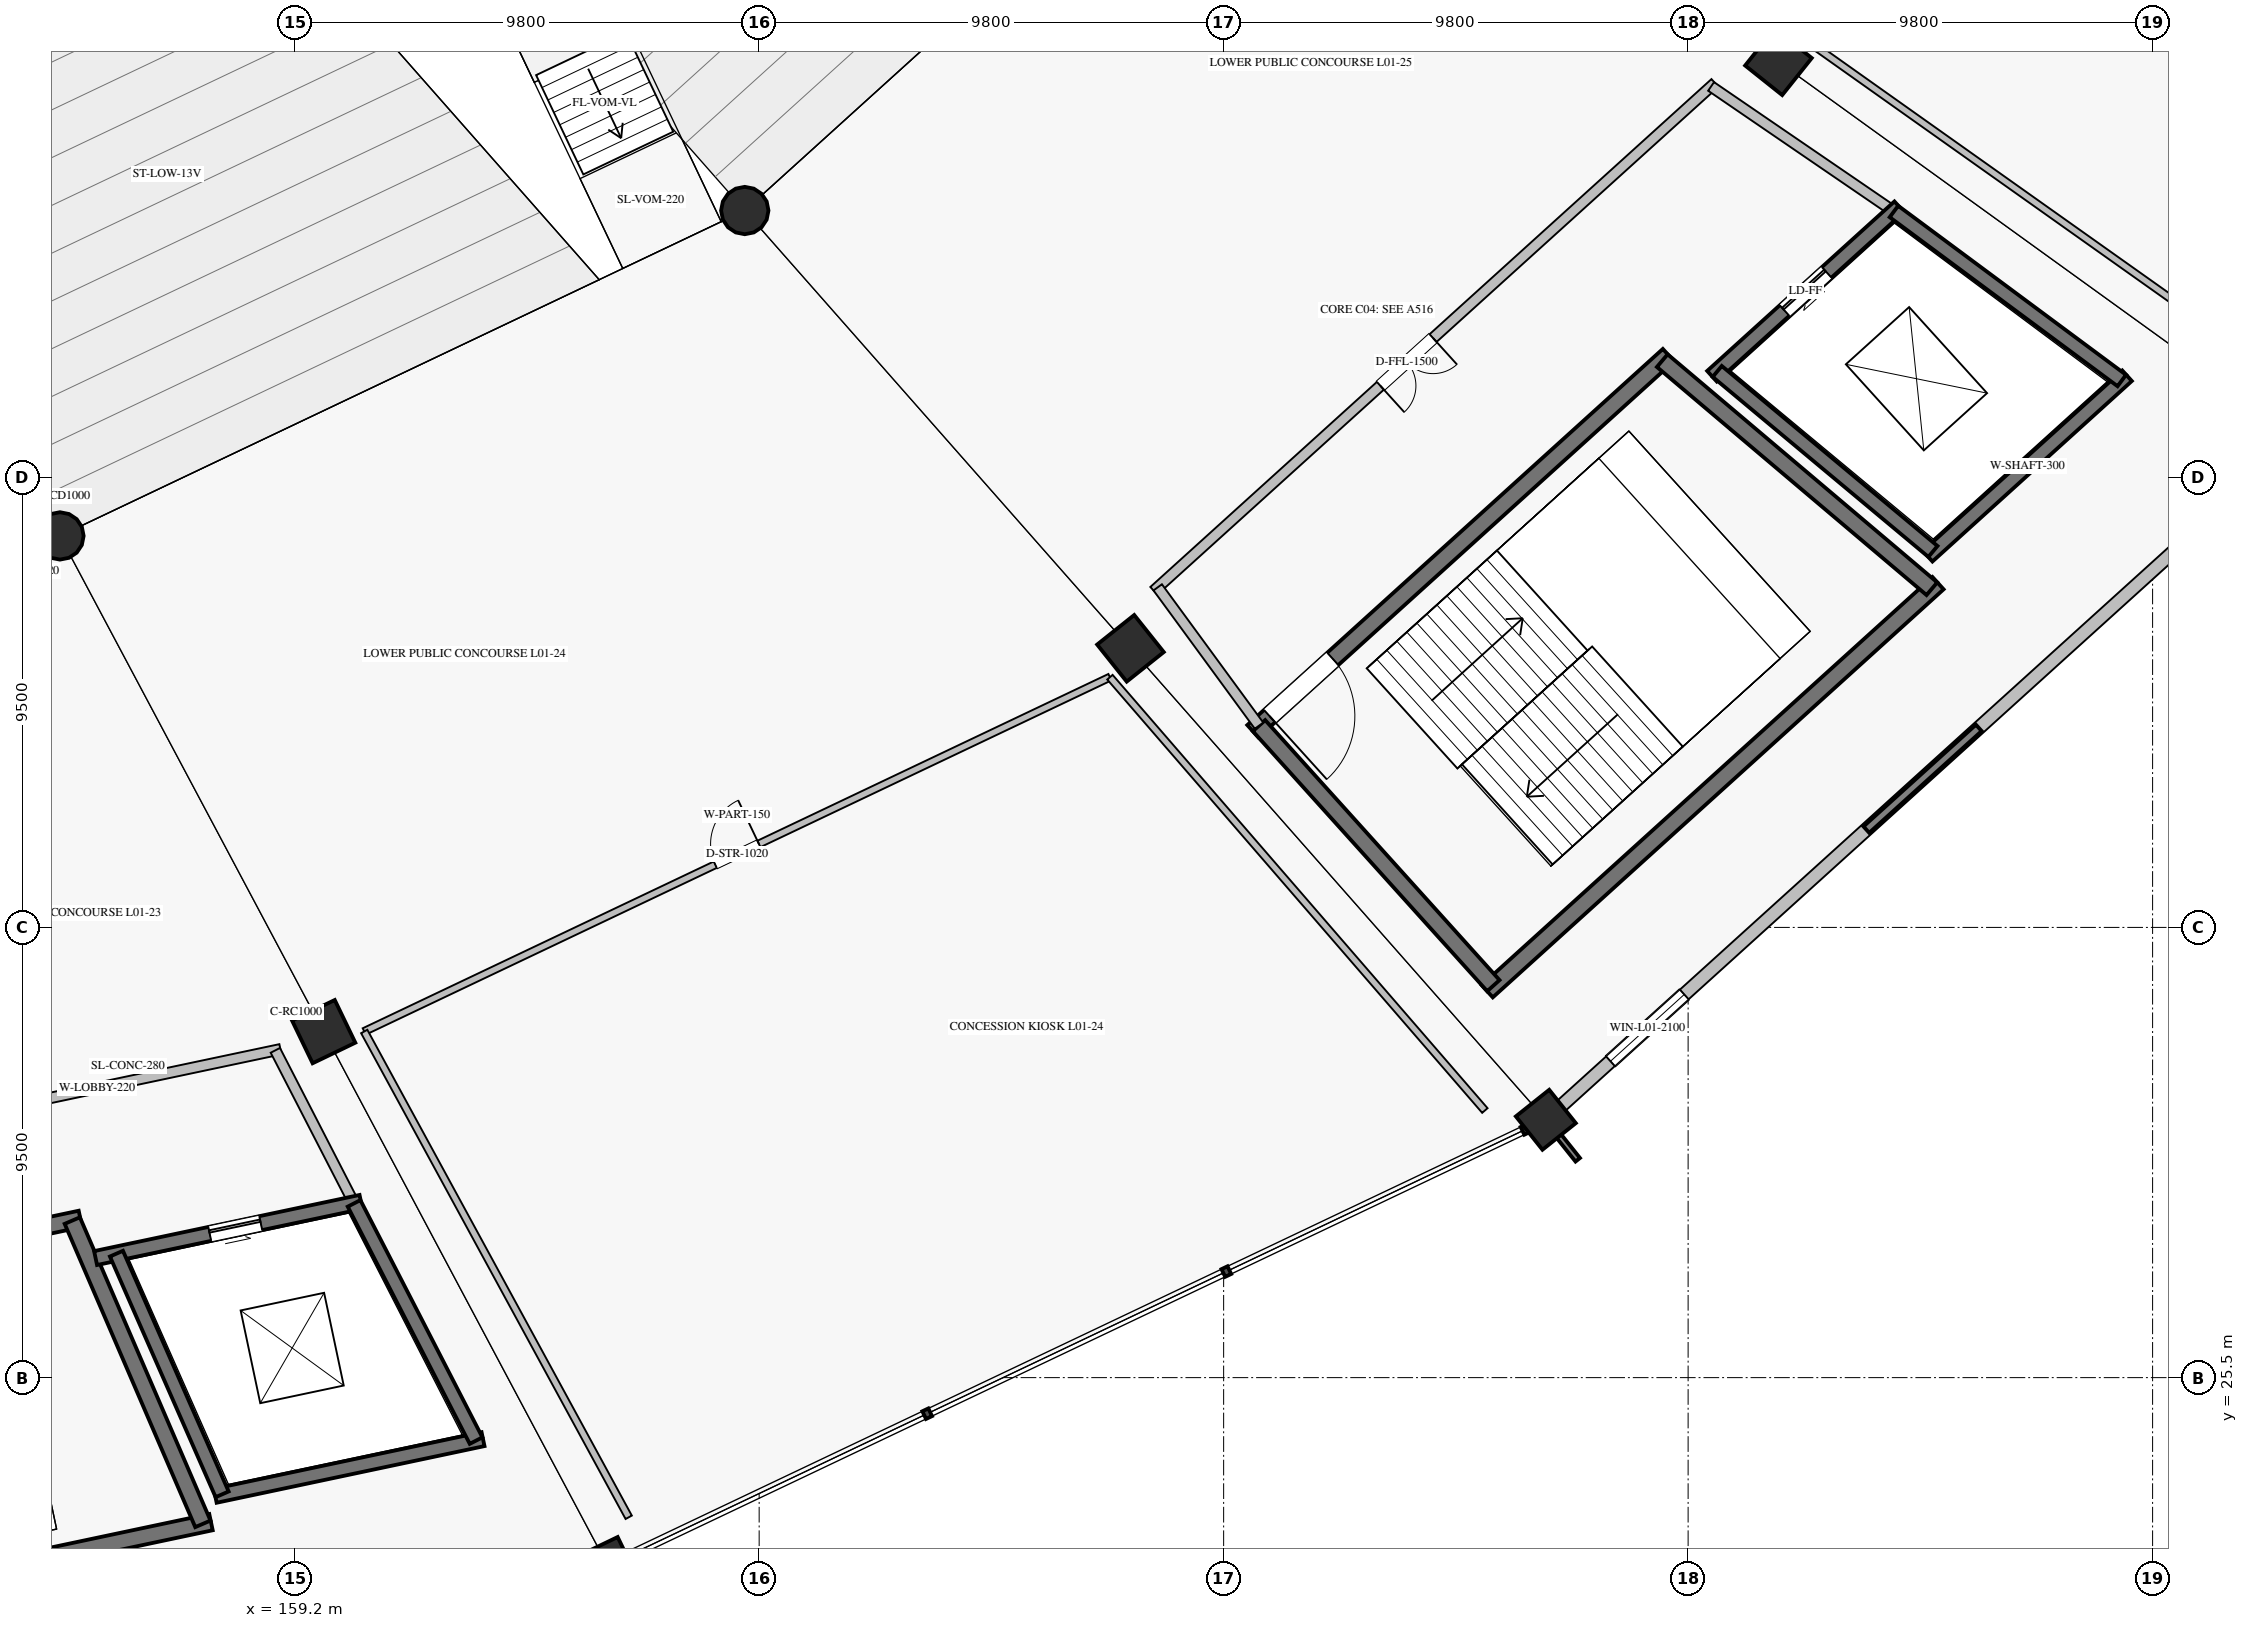
"""IFC4 building model, lengths in metres.
Left out: names, types, materials, properties, quantities, classifications, styles, units other than length and angle.
Written with IfcOpenShell. Run it as: python <this file> out.ifc"""

import sys

from ifc_helpers import new_model, si_unit, direction, frame, frame_2d, origin, origin_2d, place, context, subcontext, project, spatial, rectangle, circle, extrude, element, fill, save


model = new_model("IFC4")
c1 = context("Model", 3, precision=1e-05, world=origin(), true_north=direction((0.0, 1.0)))
c2 = subcontext(c1, "Body", "Model", "MODEL_VIEW")
j1 = project(units=[si_unit("LENGTHUNIT", "METRE"), si_unit("PLANEANGLEUNIT", "RADIAN")], contexts=[c1])
p1 = place(None, origin())
s1 = spatial("IfcSite", under=j1, at=p1, CompositionType="ELEMENT")
p2 = place(p1, origin())
s2 = spatial("IfcBuilding", under=s1, at=p2, CompositionType="ELEMENT")
p3 = place(p2, frame((0.0, 0.0, 5.78)))
s3 = spatial("IfcBuildingStorey", under=s2, at=p3, CompositionType="ELEMENT", Elevation=5.78)
for number, where, z_axis, x_axis in (
    (1, (154.248, 43.261, 0.0), (0.0, 0.0, 1.0), (0.434, -0.901, 0.0)),
    (2, (168.697, 50.127, 0.0), (0.0, 0.0, 1.0), (0.623, -0.782, 0.0)),
):
    element("IfcColumn", number, at=place(p3, frame(where, z_axis=z_axis, x_axis=x_axis)), inside=s3, PredefinedType="COLUMN", context=c2, shape_type="SweptSolid", body=[
        extrude(circle(Radius=0.5, at=origin_2d()), origin(), (0.0, 0.0, 1.0), 4.76),
    ])
for number, where, z_axis, x_axis in (
    (3, (159.812, 32.801, 0.0), (0.0, 0.0, 1.0), (0.434, -0.901, 0.0)),
    (4, (176.834, 40.889, 0.0), (0.0, 0.0, 1.0), (0.623, -0.782, 0.0)),
    (5, (190.506, 53.266, 0.0), (0.0, 0.0, 1.0), (0.782, -0.623, 0.0)),
):
    element("IfcColumn", number, at=place(p3, frame(where, z_axis=z_axis, x_axis=x_axis)), inside=s3, PredefinedType="COLUMN", context=c2, shape_type="SweptSolid", body=[
        extrude(rectangle(XDim=1.0, YDim=1.0, at=origin_2d()), origin(), (0.0, 0.0, 1.0), 4.76),
    ])
for number, where, z_axis, x_axis in (
    (6, (165.805, 21.536, 0.0), (0.0, 0.0, 1.0), (0.434, -0.901, 0.0)),
    (7, (185.598, 30.941, 0.0), (0.0, 0.0, 1.0), (0.623, -0.782, 0.0)),
):
    element("IfcColumn", number, at=place(p3, frame(where, z_axis=z_axis, x_axis=x_axis)), inside=s3, PredefinedType="COLUMN", context=c2, shape_type="SweptSolid", body=[
        extrude(rectangle(XDim=0.9, YDim=0.9, at=origin_2d()), origin(), (0.0, 0.0, 1.0), 4.76),
    ])
p4 = place(p3, frame((185.924, 31.236, 0.0), z_axis=(0.0, 0.0, 1.0), x_axis=(0.741352367697, 0.671115986183, 0.0)))
e8 = element("IfcWall", 8, at=p4, inside=s3, PredefinedType="SOLIDWALL", context=c2, shape_type="SweptSolid", body=[
    extrude(rectangle(XDim=20.564, YDim=0.275, at=frame_2d((10.282, 0.0))), origin(), (0.0, 0.0, 1.0), 3.798),
])
p5 = place(p4, frame((1.4, 0.0, 1.0)))
e9 = element("IfcOpeningElement", 9, at=p5, cuts=e8, PredefinedType="OPENING", context=c2, shape_type="SweptSolid", body=[
    extrude(rectangle(XDim=2.1, YDim=1.6, at=frame_2d((1.05, 0.8))), frame((0.0, 0.147, 0.0), z_axis=(0.0, -1.0, 0.0), x_axis=(1.0, 0.0, 0.0)), (0.0, 0.0, 1.0), 0.295),
])
p6 = place(p3, frame((142.896, 26.357, 0.0), z_axis=(0.0, 0.0, 1.0), x_axis=(0.978345203961, 0.206979858648, 0.0)))
e10 = element("IfcWall", 10, at=p6, inside=s3, PredefinedType="SHEAR", context=c2, shape_type="SweptSolid", body=[
    extrude(rectangle(XDim=12.044, YDim=0.35, at=frame_2d((6.022, 0.0))), origin(), (0.0, 0.0, 1.0), 4.5),
])
p7 = place(p6, frame((0.475, 0.0, 0.0)))
e11 = element("IfcOpeningElement", 11, at=p7, cuts=e10, PredefinedType="OPENING", context=c2, shape_type="SweptSolid", body=[
    extrude(rectangle(XDim=1.8, YDim=2.2, at=frame_2d((0.9, 1.1))), frame((0.0, 0.185, 0.0), z_axis=(0.0, -1.0, 0.0), x_axis=(1.0, 0.0, 0.0)), (0.0, 0.0, 1.0), 0.37),
])
p8 = place(p3, frame((144.65, 19.746, 0.0), z_axis=(0.0, 0.0, 1.0), x_axis=(0.978345119536, 0.206980257705, 0.0)))
e12 = element("IfcWall", 12, at=p8, inside=s3, PredefinedType="SHEAR", context=c2, shape_type="SweptSolid", body=[
    extrude(rectangle(XDim=13.067, YDim=0.35, at=frame_2d((6.533, 0.0))), origin(), (0.0, 0.0, 1.0), 4.5),
])
p9 = place(p3, frame((154.508, 28.814, 0.0), z_axis=(0.0, 0.0, 1.0), x_axis=(0.395453834155, -0.918485854574, 0.0)))
e13 = element("IfcWall", 13, at=p9, inside=s3, PredefinedType="SHEAR", context=c2, shape_type="SweptSolid", body=[
    extrude(rectangle(XDim=6.968, YDim=0.35, at=frame_2d((3.484, 0.0))), origin(), (0.0, 0.0, 1.0), 4.5),
])
p10 = place(p3, frame((154.999, 28.023, 0.0), z_axis=(0.0, 0.0, 1.0), x_axis=(0.978345218992, 0.206979787601, 0.0)))
e14 = element("IfcWall", 14, at=p10, inside=s3, PredefinedType="SHEAR", context=c2, shape_type="SweptSolid", body=[
    extrude(rectangle(XDim=5.724, YDim=0.3, at=frame_2d((2.862, 0.0))), origin(), (0.0, 0.0, 1.0), 4.5),
])
p11 = place(p10, frame((2.462, 0.0, 0.0)))
e15 = element("IfcOpeningElement", 15, at=p11, cuts=e14, PredefinedType="OPENING", context=c2, shape_type="SweptSolid", body=[
    extrude(rectangle(XDim=1.1, YDim=2.2, at=frame_2d((0.55, 1.1))), frame((0.0, 0.16, 0.0), z_axis=(0.0, -1.0, 0.0), x_axis=(1.0, 0.0, 0.0)), (0.0, 0.0, 1.0), 0.32),
])
p12 = place(p3, frame((157.523, 23.006, 0.0), z_axis=(0.0, 0.0, 1.0), x_axis=(0.978347069901, 0.206971038591, 0.0)))
e16 = element("IfcWall", 16, at=p12, inside=s3, PredefinedType="SHEAR", context=c2, shape_type="SweptSolid", body=[
    extrude(rectangle(XDim=5.776, YDim=0.3, at=frame_2d((2.888, 0.0))), origin(), (0.0, 0.0, 1.0), 4.5),
])
p13 = place(p3, frame((155.44, 28.116, 0.0), z_axis=(0.0, 0.0, 1.0), x_axis=(0.402005363577, -0.915637312289, 0.0)))
e17 = element("IfcWall", 17, at=p13, inside=s3, PredefinedType="SHEAR", context=c2, shape_type="SweptSolid", body=[
    extrude(rectangle(XDim=5.547, YDim=0.3, at=frame_2d((2.773, 0.0))), origin(), (0.0, 0.0, 1.0), 4.5),
])
p14 = place(p3, frame((160.453, 29.177, 0.0), z_axis=(0.0, 0.0, 1.0), x_axis=(0.457368592987, -0.889277217829, 0.0)))
e18 = element("IfcWall", 18, at=p14, inside=s3, PredefinedType="SHEAR", context=c2, shape_type="SweptSolid", body=[
    extrude(rectangle(XDim=5.629, YDim=0.3, at=frame_2d((2.814, 0.0))), origin(), (0.0, 0.0, 1.0), 4.5),
])
p15 = place(p3, frame((142.284, 28.914, 0.0), z_axis=(0.0, 0.0, 1.0), x_axis=(0.97834522483, 0.206979760008, 0.0)))
e19 = element("IfcWall", 19, at=p15, inside=s3, PredefinedType="SOLIDWALL", context=c2, shape_type="SweptSolid", body=[
    extrude(rectangle(XDim=16.983, YDim=0.22, at=frame_2d((8.491, 0.0))), origin(), (0.0, 0.0, 1.0), 3.448),
])
p16 = place(p15, frame((6.903, 0.0, 0.0)))
e20 = element("IfcOpeningElement", 20, at=p16, cuts=e19, PredefinedType="OPENING", context=c2, shape_type="SweptSolid", body=[
    extrude(rectangle(XDim=1.5, YDim=2.2, at=frame_2d((0.75, 1.1))), frame((0.0, 0.12, 0.0), z_axis=(0.0, -1.0, 0.0), x_axis=(1.0, 0.0, 0.0)), (0.0, 0.0, 1.0), 0.24),
])
p17 = place(p3, frame((158.792, 32.406, 0.0), z_axis=(0.0, 0.0, 1.0), x_axis=(0.457349531643, -0.889287021105, 0.0)))
e21 = element("IfcWall", 21, at=p17, inside=s3, PredefinedType="SOLIDWALL", context=c2, shape_type="SweptSolid", body=[
    extrude(rectangle(XDim=3.632, YDim=0.22, at=frame_2d((1.816, 0.0))), origin(), (0.0, 0.0, 1.0), 4.5),
])
p18 = place(p3, frame((179.417, 39.14, 0.0), z_axis=(0.0, 0.0, 1.0), x_axis=(0.741348929385, 0.671119784315, 0.0)))
e22 = element("IfcWall", 22, at=p18, inside=s3, PredefinedType="SHEAR", context=c2, shape_type="SweptSolid", body=[
    extrude(rectangle(XDim=11.826, YDim=0.35, at=frame_2d((5.913, 0.0))), origin(), (0.0, 0.0, 1.0), 4.5),
])
p19 = place(p18, frame((0.475, 0.0, 0.0)))
e23 = element("IfcOpeningElement", 23, at=p19, cuts=e22, PredefinedType="OPENING", context=c2, shape_type="SweptSolid", body=[
    extrude(rectangle(XDim=1.8, YDim=2.2, at=frame_2d((0.9, 1.1))), frame((0.0, 0.185, 0.0), z_axis=(0.0, -1.0, 0.0), x_axis=(1.0, 0.0, 0.0)), (0.0, 0.0, 1.0), 0.37),
])
p20 = place(p3, frame((184.361, 33.653, 0.0), z_axis=(0.0, 0.0, 1.0), x_axis=(0.741351373721, 0.671117084183, 0.0)))
e24 = element("IfcWall", 24, at=p20, inside=s3, PredefinedType="SHEAR", context=c2, shape_type="SweptSolid", body=[
    extrude(rectangle(XDim=12.83, YDim=0.35, at=frame_2d((6.415, 0.0))), origin(), (0.0, 0.0, 1.0), 4.5),
])
p21 = place(p3, frame((179.546, 39.257, 0.0), z_axis=(0.0, 0.0, 1.0), x_axis=(0.669463145673, -0.742845270958, 0.0)))
e25 = element("IfcWall", 25, at=p21, inside=s3, PredefinedType="SHEAR", context=c2, shape_type="SweptSolid", body=[
    extrude(rectangle(XDim=7.386, YDim=0.35, at=frame_2d((3.693, 0.0))), origin(), (0.0, 0.0, 1.0), 4.5),
])
p22 = place(p3, frame((188.055, 46.959, 0.0), z_axis=(0.0, 0.0, 1.0), x_axis=(0.763422324031, -0.64589964791, 0.0)))
e26 = element("IfcWall", 26, at=p22, inside=s3, PredefinedType="SHEAR", context=c2, shape_type="SweptSolid", body=[
    extrude(rectangle(XDim=7.452, YDim=0.35, at=frame_2d((3.726, 0.0))), origin(), (0.0, 0.0, 1.0), 4.5),
])
p23 = place(p3, frame((189.103, 46.631, 0.0), z_axis=(0.0, 0.0, 1.0), x_axis=(0.741350155641, 0.671118429736, 0.0)))
e27 = element("IfcWall", 27, at=p23, inside=s3, PredefinedType="SHEAR", context=c2, shape_type="SweptSolid", body=[
    extrude(rectangle(XDim=5.329, YDim=0.3, at=frame_2d((2.665, 0.0))), origin(), (0.0, 0.0, 1.0), 4.5),
])
p24 = place(p23, frame((2.065, 0.0, 0.0)))
e28 = element("IfcOpeningElement", 28, at=p24, cuts=e27, PredefinedType="OPENING", context=c2, shape_type="SweptSolid", body=[
    extrude(rectangle(XDim=1.2, YDim=2.2, at=frame_2d((0.6, 1.1))), frame((0.0, 0.16, 0.0), z_axis=(0.0, -1.0, 0.0), x_axis=(1.0, 0.0, 0.0)), (0.0, 0.0, 1.0), 0.32),
])
p25 = place(p3, frame((193.654, 42.832, 0.0), z_axis=(0.0, 0.0, 1.0), x_axis=(0.74134208775, 0.671127341815, 0.0)))
e29 = element("IfcWall", 29, at=p25, inside=s3, PredefinedType="SHEAR", context=c2, shape_type="SweptSolid", body=[
    extrude(rectangle(XDim=5.675, YDim=0.3, at=frame_2d((2.837, 0.0))), origin(), (0.0, 0.0, 1.0), 4.5),
])
p26 = place(p3, frame((189.214, 46.732, 0.0), z_axis=(0.0, 0.0, 1.0), x_axis=(0.767711354146, -0.640795815151, 0.0)))
e30 = element("IfcWall", 30, at=p26, inside=s3, PredefinedType="SHEAR", context=c2, shape_type="SweptSolid", body=[
    extrude(rectangle(XDim=5.929, YDim=0.3, at=frame_2d((2.964, 0.0))), origin(), (0.0, 0.0, 1.0), 4.5),
])
p27 = place(p3, frame((192.942, 50.107, 0.0), z_axis=(0.0, 0.0, 1.0), x_axis=(0.803101805449, -0.59584183311, 0.0)))
e31 = element("IfcWall", 31, at=p27, inside=s3, PredefinedType="SHEAR", context=c2, shape_type="SweptSolid", body=[
    extrude(rectangle(XDim=5.986, YDim=0.3, at=frame_2d((2.993, 0.0))), origin(), (0.0, 0.0, 1.0), 4.5),
])
p28 = place(p3, frame((177.327, 42.102, 0.0), z_axis=(0.0, 0.0, 1.0), x_axis=(0.741351035574, 0.671117457717, 0.0)))
e32 = element("IfcWall", 32, at=p28, inside=s3, PredefinedType="SOLIDWALL", context=c2, shape_type="SweptSolid", body=[
    extrude(rectangle(XDim=15.969, YDim=0.22, at=frame_2d((7.985, 0.0))), origin(), (0.0, 0.0, 1.0), 4.5),
])
p29 = place(p28, frame((6.447, 0.0, 0.0)))
e33 = element("IfcOpeningElement", 33, at=p29, cuts=e32, PredefinedType="OPENING", context=c2, shape_type="SweptSolid", body=[
    extrude(rectangle(XDim=1.5, YDim=2.2, at=frame_2d((0.75, 1.1))), frame((0.0, 0.12, 0.0), z_axis=(0.0, -1.0, 0.0), x_axis=(1.0, 0.0, 0.0)), (0.0, 0.0, 1.0), 0.24),
])
p30 = place(p3, frame((177.409, 42.176, 0.0), z_axis=(0.0, 0.0, 1.0), x_axis=(0.590836915359, -0.806791013491, 0.0)))
e34 = element("IfcWall", 34, at=p30, inside=s3, PredefinedType="SOLIDWALL", context=c2, shape_type="SweptSolid", body=[
    extrude(rectangle(XDim=3.618, YDim=0.22, at=frame_2d((1.809, 0.0))), origin(), (0.0, 0.0, 1.0), 4.5),
])
p31 = place(p3, frame((189.085, 52.746, 0.0), z_axis=(0.0, 0.0, 1.0), x_axis=(0.825385410642, -0.564569680287, 0.0)))
e35 = element("IfcWall", 35, at=p31, inside=s3, PredefinedType="SOLIDWALL", context=c2, shape_type="SweptSolid", body=[
    extrude(rectangle(XDim=4.674, YDim=0.22, at=frame_2d((2.337, 0.0))), origin(), (0.0, 0.0, 1.0), 4.5),
])
p32 = place(p3, frame((160.667, 32.804, 0.0), z_axis=(0.0, 0.0, 1.0), x_axis=(0.903217202186, 0.429183743488, 0.0)))
e36 = element("IfcWall", 36, at=p32, inside=s3, PredefinedType="PARTITIONING", context=c2, shape_type="SweptSolid", body=[
    extrude(rectangle(XDim=17.419, YDim=0.15, at=frame_2d((8.709, 0.0))), origin(), (0.0, 0.0, 1.0), 3.82),
])
p33 = place(p32, frame((8.2, 0.0, 0.0)))
e37 = element("IfcOpeningElement", 37, at=p33, cuts=e36, PredefinedType="OPENING", context=c2, shape_type="SweptSolid", body=[
    extrude(rectangle(XDim=1.02, YDim=2.1, at=frame_2d((0.51, 1.05))), frame((0.0, 0.085, 0.0), z_axis=(0.0, -1.0, 0.0), x_axis=(1.0, 0.0, 0.0)), (0.0, 0.0, 1.0), 0.17),
])
p34 = place(p3, frame((160.667, 32.804, 0.0), z_axis=(0.0, 0.0, 1.0), x_axis=(0.478125060974, -0.878291765912, 0.0)))
e38 = element("IfcWall", 38, at=p34, inside=s3, PredefinedType="PARTITIONING", context=c2, shape_type="SweptSolid", body=[
    extrude(rectangle(XDim=11.672, YDim=0.15, at=frame_2d((5.836, 0.0))), origin(), (0.0, 0.0, 1.0), 3.82),
])
p35 = place(p3, frame((176.401, 40.28, 0.0), z_axis=(0.0, 0.0, 1.0), x_axis=(0.654293035882, -0.756241114458, 0.0)))
e39 = element("IfcWall", 39, at=p35, inside=s3, PredefinedType="PARTITIONING", context=c2, shape_type="SweptSolid", body=[
    extrude(rectangle(XDim=12.091, YDim=0.15, at=frame_2d((6.045, 0.0))), origin(), (0.0, 0.0, 1.0), 3.82),
])
p36 = place(p3, frame((191.179, 53.658, 0.0), z_axis=(0.0, 0.0, 1.0), x_axis=(0.815753527099, -0.578399674122, 0.0)))
e40 = element("IfcWall", 40, at=p36, inside=s3, PredefinedType="PARTITIONING", context=c2, shape_type="SweptSolid", body=[
    extrude(rectangle(XDim=12.382, YDim=0.15, at=frame_2d((6.191, 0.0))), origin(), (0.0, 0.0, 1.0), 3.82),
])
p37 = place(p5, origin())
e41 = element("IfcWindow", 41, at=p37, inside=s3, PartitioningType="SINGLE_PANEL", PredefinedType="WINDOW", context=c2, shape_type="SweptSolid", body=[
    extrude(rectangle(XDim=2.1, YDim=1.6, at=frame_2d((1.05, 0.8))), frame((0.0, 0.03, 0.0), z_axis=(0.0, -1.0, 0.0), x_axis=(1.0, 0.0, 0.0)), (0.0, 0.0, 1.0), 0.06),
])
fill(e9, e41)
p38 = place(p11, origin())
e42 = element("IfcDoor", 42, at=p38, inside=s3, OperationType="SLIDING_TO_RIGHT", PredefinedType="DOOR", context=c2, shape_type="SweptSolid", body=[
    extrude(rectangle(XDim=1.1, YDim=2.2, at=frame_2d((0.55, 1.1))), frame((0.0, 0.025, 0.0), z_axis=(0.0, -1.0, 0.0), x_axis=(1.0, 0.0, 0.0)), (0.0, 0.0, 1.0), 0.05),
])
fill(e15, e42)
p39 = place(p19, frame((1.8, 0.0, 0.0), z_axis=(0.0, 0.0, 1.0), x_axis=(-1.0, 0.0, 0.0)))
e43 = element("IfcDoor", 43, at=p39, inside=s3, OperationType="SINGLE_SWING_RIGHT", PredefinedType="DOOR", context=c2, shape_type="SweptSolid", body=[
    extrude(rectangle(XDim=1.8, YDim=2.2, at=frame_2d((0.9, 1.1))), frame((0.0, 0.025, 0.0), z_axis=(0.0, -1.0, 0.0), x_axis=(1.0, 0.0, 0.0)), (0.0, 0.0, 1.0), 0.05),
])
fill(e23, e43)
p40 = place(p24, origin())
e44 = element("IfcDoor", 44, at=p40, inside=s3, OperationType="SLIDING_TO_LEFT", PredefinedType="DOOR", context=c2, shape_type="SweptSolid", body=[
    extrude(rectangle(XDim=1.2, YDim=2.2, at=frame_2d((0.6, 1.1))), frame((0.0, 0.025, 0.0), z_axis=(0.0, -1.0, 0.0), x_axis=(1.0, 0.0, 0.0)), (0.0, 0.0, 1.0), 0.05),
])
fill(e28, e44)
p41 = place(p29, frame((1.5, 0.0, 0.0), z_axis=(0.0, 0.0, 1.0), x_axis=(-1.0, 0.0, 0.0)))
e45 = element("IfcDoor", 45, at=p41, inside=s3, OperationType="DOUBLE_DOOR_SINGLE_SWING", PredefinedType="DOOR", context=c2, shape_type="SweptSolid", body=[
    extrude(rectangle(XDim=1.5, YDim=2.2, at=frame_2d((0.75, 1.1))), frame((0.0, 0.025, 0.0), z_axis=(0.0, -1.0, 0.0), x_axis=(1.0, 0.0, 0.0)), (0.0, 0.0, 1.0), 0.05),
])
fill(e33, e45)
p42 = place(p33, origin())
e46 = element("IfcDoor", 46, at=p42, inside=s3, OperationType="SINGLE_SWING_RIGHT", PredefinedType="DOOR", context=c2, shape_type="SweptSolid", body=[
    extrude(rectangle(XDim=1.02, YDim=2.1, at=frame_2d((0.51, 1.05))), frame((0.0, 0.025, 0.0), z_axis=(0.0, -1.0, 0.0), x_axis=(1.0, 0.0, 0.0)), (0.0, 0.0, 1.0), 0.05),
])
fill(e37, e46)
save(model, sys.argv[1])
